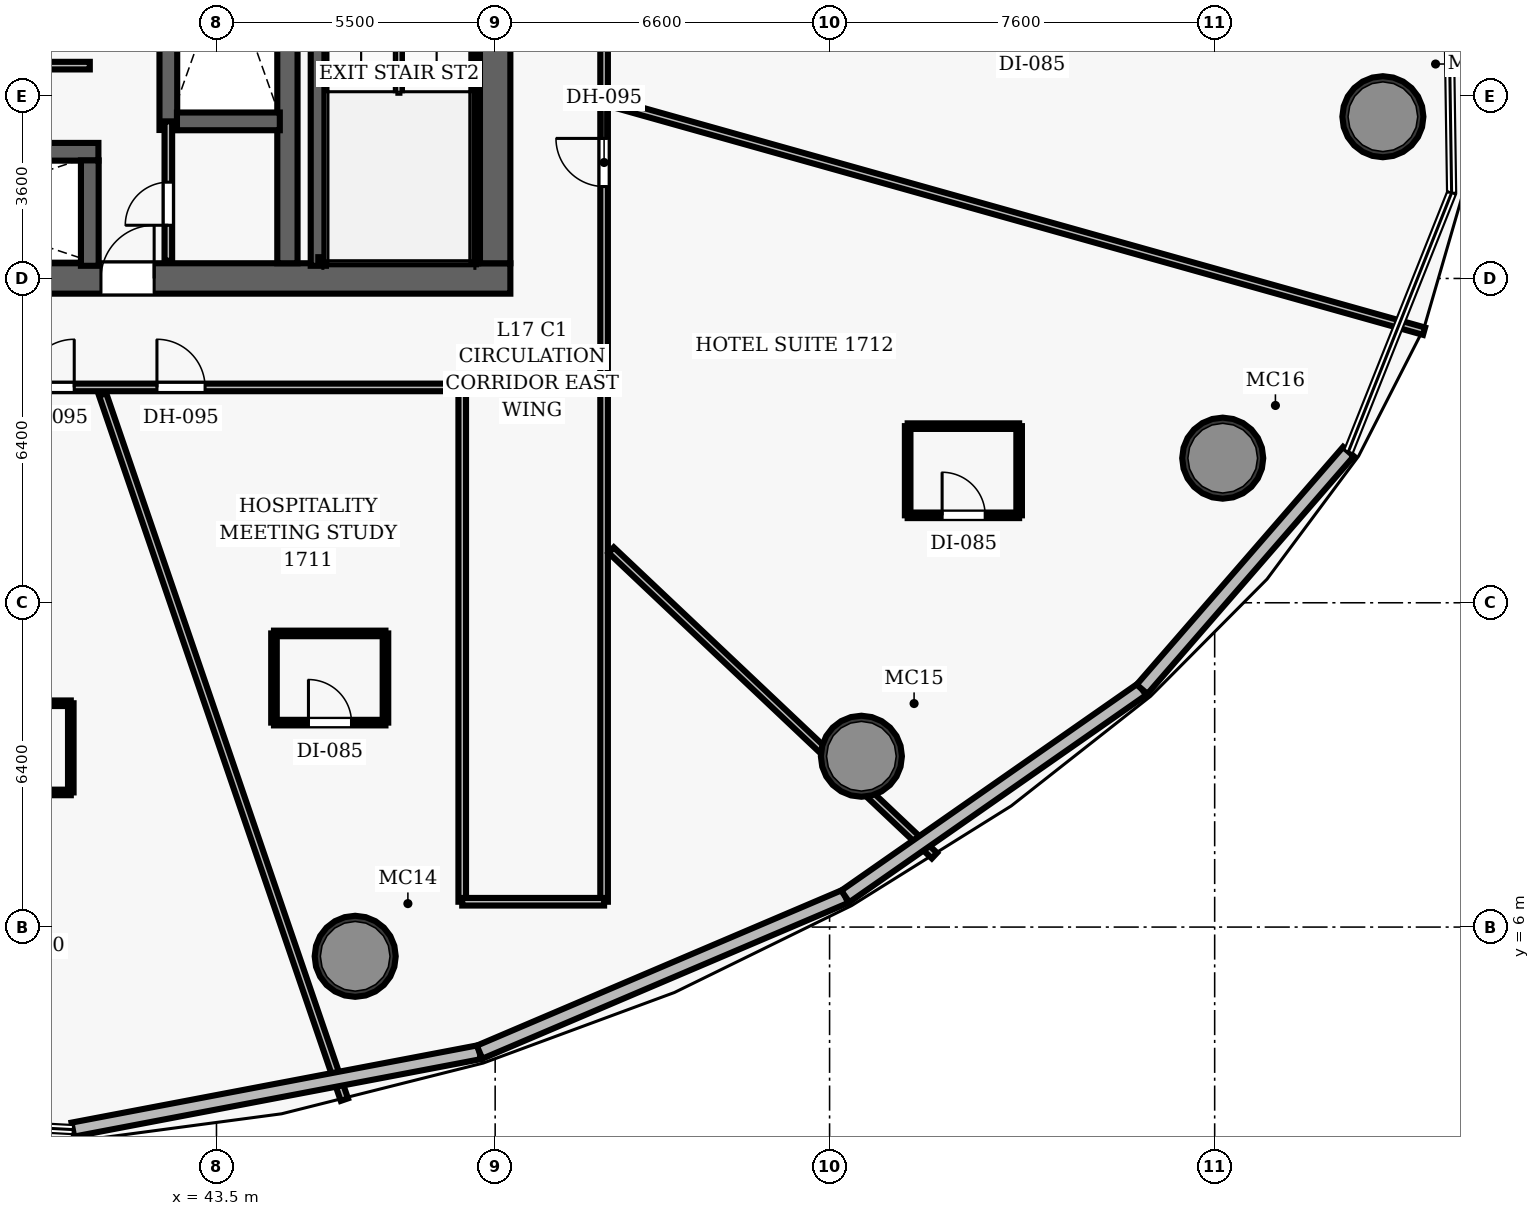
"""IFC4 building model, lengths in metres.
Left out: names, types, materials, properties, quantities, classifications, styles, units other than length and angle.
Written with IfcOpenShell. Run it as: python <this file> out.ifc"""

import sys

from ifc_helpers import new_model, si_unit, direction, frame, frame_2d, origin, origin_2d, place, context, subcontext, project, spatial, rectangle, hollow_circle, extrude, element, fill, save


model = new_model("IFC4")
c1 = context("Model", 3, precision=1e-05, world=origin(), true_north=direction((0.0, 1.0)))
c2 = subcontext(c1, "Body", "Model", "MODEL_VIEW")
j1 = project(units=[si_unit("LENGTHUNIT", "METRE"), si_unit("PLANEANGLEUNIT", "RADIAN")], contexts=[c1])
p1 = place(None, origin())
s1 = spatial("IfcSite", under=j1, at=p1, CompositionType="ELEMENT")
p2 = place(p1, origin())
s2 = spatial("IfcBuilding", under=s1, at=p2, CompositionType="ELEMENT")
p3 = place(p2, frame((0.0, 0.0, 76.4)))
s3 = spatial("IfcBuildingStorey", under=s2, at=p3, CompositionType="ELEMENT", Elevation=76.4)
p4 = place(p3, frame((26.7, 18.8, 0.0), z_axis=(0.0, 0.0, 1.0), x_axis=(1.0, 0.0, 0.0)))
e1 = element("IfcWall", 1, at=p4, inside=s3, PredefinedType="SHEAR", context=c2, shape_type="SweptSolid", body=[
    extrude(rectangle(XDim=22.6, YDim=0.6, at=frame_2d((11.3, 0.0))), origin(), (0.0, 0.0, 1.0), 3.5),
])
p5 = place(p4, frame((14.52, 0.0, 0.0)))
e2 = element("IfcOpeningElement", 2, at=p5, cuts=e1, PredefinedType="OPENING", context=c2, shape_type="SweptSolid", body=[
    extrude(rectangle(XDim=1.05, YDim=2.15, at=frame_2d((0.525, 1.075))), frame((0.0, 0.31, 0.0), z_axis=(0.0, -1.0, 0.0), x_axis=(1.0, 0.0, 0.0)), (0.0, 0.0, 1.0), 0.62),
])
p6 = place(p3, frame((49.0, 19.1, 0.0), z_axis=(0.0, 0.0, 1.0), x_axis=(0.0, 1.0, 0.0)))
e3 = element("IfcWall", 3, at=p6, inside=s3, PredefinedType="SHEAR", context=c2, shape_type="SweptSolid", body=[
    extrude(rectangle(XDim=13.8, YDim=0.6, at=frame_2d((6.9, 0.0))), origin(), (0.0, 0.0, 1.0), 3.5),
])
p7 = place(p6, frame((8.2, 0.0, 0.0)))
e4 = element("IfcOpeningElement", 4, at=p7, cuts=e3, PredefinedType="OPENING", context=c2, shape_type="SweptSolid", body=[
    extrude(rectangle(XDim=1.05, YDim=2.15, at=frame_2d((0.525, 1.075))), frame((0.0, 0.31, 0.0), z_axis=(0.0, -1.0, 0.0), x_axis=(1.0, 0.0, 0.0)), (0.0, 0.0, 1.0), 0.62),
])
p8 = place(p3, frame((44.9, 19.1, 0.0), z_axis=(0.0, 0.0, 1.0), x_axis=(0.0, 1.0, 0.0)))
e5 = element("IfcWall", 5, at=p8, inside=s3, PredefinedType="SHEAR", context=c2, shape_type="SweptSolid", body=[
    extrude(rectangle(XDim=13.8, YDim=0.4, at=frame_2d((6.9, 0.0))), origin(), (0.0, 0.0, 1.0), 3.5),
])
for number, where, z_axis, x_axis in (
    (6, (66.52, 21.992, 0.0), (0.0, 0.0, 1.0), (1.0, 0.0, 0.0)),
    (7, (46.238, 5.423, 0.0), (0.0, 0.0, 1.0), (1.0, 0.0, 0.0)),
    (8, (56.228, 9.371, 0.0), (0.0, 0.0, 1.0), (1.0, 0.0, 0.0)),
    (9, (63.359, 15.254, 0.0), (0.0, 0.0, 1.0), (1.0, 0.0, 0.0)),
):
    element("IfcColumn", number, at=place(p3, frame(where, z_axis=z_axis, x_axis=x_axis)), inside=s3, PredefinedType="COLUMN", context=c2, shape_type="SweptSolid", body=[
        extrude(hollow_circle(Radius=0.8, WallThickness=0.06, at=origin_2d()), origin(), (0.0, 0.0, 1.0), 3.5),
    ])
p9 = place(p3, frame((45.51, 19.05, 0.0), z_axis=(0.0, 0.0, 1.0), x_axis=(0.0, 1.0, 0.0)))
e10 = element("IfcWall", 10, at=p9, inside=s3, PredefinedType="SHEAR", context=c2, shape_type="SweptSolid", body=[
    extrude(rectangle(XDim=7.5, YDim=0.3, at=frame_2d((3.75, 0.0))), origin(), (0.0, 0.0, 1.0), 3.5),
])
p10 = place(p3, frame((48.605, 19.1, 0.0), z_axis=(0.0, 0.0, 1.0), x_axis=(0.0, 1.0, 0.0)))
e11 = element("IfcWall", 11, at=p10, inside=s3, PredefinedType="SHEAR", context=c2, shape_type="SweptSolid", body=[
    extrude(rectangle(XDim=7.45, YDim=0.12, at=frame_2d((3.725, 0.0))), origin(), (0.0, 0.0, 1.0), 3.5),
])
p11 = place(p3, frame((45.51, 19.16, 0.0), z_axis=(0.0, 0.0, 1.0), x_axis=(1.0, 0.0, 0.0)))
e12 = element("IfcWall", 12, at=p11, inside=s3, PredefinedType="SHEAR", context=c2, shape_type="SweptSolid", body=[
    extrude(rectangle(XDim=3.095, YDim=0.12, at=frame_2d((1.547, 0.0))), origin(), (0.0, 0.0, 1.0), 3.5),
])
p12 = place(p3, frame((42.55, 21.73, 0.0), z_axis=(0.0, 0.0, 1.0), x_axis=(0.0, 1.0, 0.0)))
e13 = element("IfcWall", 13, at=p12, inside=s3, PredefinedType="SHEAR", context=c2, shape_type="SweptSolid", body=[
    extrude(rectangle(XDim=6.54, YDim=0.35, at=frame_2d((3.27, 0.0))), origin(), (0.0, 0.0, 1.0), 2.6),
])
p13 = place(p3, frame((42.72, 21.9, 0.0), z_axis=(0.0, 0.0, 1.0), x_axis=(1.0, 0.0, 0.0)))
e14 = element("IfcWall", 14, at=p13, inside=s3, PredefinedType="SHEAR", context=c2, shape_type="SweptSolid", body=[
    extrude(rectangle(XDim=2.03, YDim=0.35, at=frame_2d((1.015, 0.0))), origin(), (0.0, 0.0, 1.0), 2.6),
])
p14 = place(p3, frame((34.49, 21.3, 0.0), z_axis=(0.0, 0.0, 1.0), x_axis=(1.0, 0.0, 0.0)))
e15 = element("IfcWall", 15, at=p14, inside=s3, PredefinedType="SHEAR", context=c2, shape_type="SweptSolid", body=[
    extrude(rectangle(XDim=6.68, YDim=0.35, at=frame_2d((3.34, 0.0))), origin(), (0.0, 0.0, 1.0), 2.6),
])
p15 = place(p3, frame((41.0, 19.05, 0.0), z_axis=(0.0, 0.0, 1.0), x_axis=(0.0, 1.0, 0.0)))
e16 = element("IfcWall", 16, at=p15, inside=s3, PredefinedType="SHEAR", context=c2, shape_type="SweptSolid", body=[
    extrude(rectangle(XDim=2.08, YDim=0.35, at=frame_2d((1.04, 0.0))), origin(), (0.0, 0.0, 1.0), 2.6),
])
p16 = place(p3, frame((34.75, 23.0, 0.0), z_axis=(0.0, 0.0, 1.0), x_axis=(1.0, 0.0, 0.0)))
e17 = element("IfcWall", 17, at=p16, inside=s3, PredefinedType="PARTITIONING", context=c2, shape_type="SweptSolid", body=[
    extrude(rectangle(XDim=6.25, YDim=0.15, at=frame_2d((3.125, 0.0))), origin(), (0.0, 0.0, 1.0), 2.6),
])
p17 = place(p3, frame((42.55, 19.15, 0.0), z_axis=(0.0, 0.0, 1.0), x_axis=(0.0, 1.0, 0.0)))
e18 = element("IfcWall", 18, at=p17, inside=s3, PredefinedType="PARTITIONING", context=c2, shape_type="SweptSolid", body=[
    extrude(rectangle(XDim=2.75, YDim=0.15, at=frame_2d((1.375, 0.0))), origin(), (0.0, 0.0, 1.0), 2.6),
])
p18 = place(p17, frame((0.7, 0.0, 0.0)))
e19 = element("IfcOpeningElement", 19, at=p18, cuts=e18, PredefinedType="OPENING", context=c2, shape_type="SweptSolid", body=[
    extrude(rectangle(XDim=0.85, YDim=2.1, at=frame_2d((0.425, 1.05))), frame((0.0, 0.085, 0.0), z_axis=(0.0, -1.0, 0.0), x_axis=(1.0, 0.0, 0.0)), (0.0, 0.0, 1.0), 0.17),
])
p19 = place(p3, frame((24.85, 16.65, 0.0), z_axis=(0.0, 0.0, 1.0), x_axis=(1.0, 0.0, 0.0)))
e20 = element("IfcWall", 20, at=p19, inside=s3, PredefinedType="PARTITIONING", context=c2, shape_type="SweptSolid", body=[
    extrude(rectangle(XDim=23.5, YDim=0.15, at=frame_2d((11.75, 0.0))), origin(), (0.0, 0.0, 1.0), 2.6),
])
p20 = place(p19, frame((4.362, 0.0, 0.0)))
e21 = element("IfcOpeningElement", 21, at=p20, cuts=e20, PredefinedType="OPENING", context=c2, shape_type="SweptSolid", body=[
    extrude(rectangle(XDim=0.95, YDim=2.15, at=frame_2d((0.475, 1.075))), frame((0.0, 0.085, 0.0), z_axis=(0.0, -1.0, 0.0), x_axis=(1.0, 0.0, 0.0)), (0.0, 0.0, 1.0), 0.17),
])
p21 = place(p19, frame((8.439, 0.0, 0.0)))
e22 = element("IfcOpeningElement", 22, at=p21, cuts=e20, PredefinedType="OPENING", context=c2, shape_type="SweptSolid", body=[
    extrude(rectangle(XDim=0.95, YDim=2.15, at=frame_2d((0.475, 1.075))), frame((0.0, 0.085, 0.0), z_axis=(0.0, -1.0, 0.0), x_axis=(1.0, 0.0, 0.0)), (0.0, 0.0, 1.0), 0.17),
])
p22 = place(p19, frame((14.893, 0.0, 0.0)))
e23 = element("IfcOpeningElement", 23, at=p22, cuts=e20, PredefinedType="OPENING", context=c2, shape_type="SweptSolid", body=[
    extrude(rectangle(XDim=0.95, YDim=2.15, at=frame_2d((0.475, 1.075))), frame((0.0, 0.085, 0.0), z_axis=(0.0, -1.0, 0.0), x_axis=(1.0, 0.0, 0.0)), (0.0, 0.0, 1.0), 0.17),
])
p23 = place(p19, frame((17.475, 0.0, 0.0)))
e24 = element("IfcOpeningElement", 24, at=p23, cuts=e20, PredefinedType="OPENING", context=c2, shape_type="SweptSolid", body=[
    extrude(rectangle(XDim=0.95, YDim=2.15, at=frame_2d((0.475, 1.075))), frame((0.0, 0.085, 0.0), z_axis=(0.0, -1.0, 0.0), x_axis=(1.0, 0.0, 0.0)), (0.0, 0.0, 1.0), 0.17),
])
p24 = place(p3, frame((51.15, 16.65, 0.0), z_axis=(0.0, 0.0, 1.0), x_axis=(0.0, 1.0, 0.0)))
e25 = element("IfcWall", 25, at=p24, inside=s3, PredefinedType="PARTITIONING", context=c2, shape_type="SweptSolid", body=[
    extrude(rectangle(XDim=15.9, YDim=0.15, at=frame_2d((7.95, 0.0))), origin(), (0.0, 0.0, 1.0), 2.6),
])
p25 = place(p24, frame((12.808, 0.0, 0.0)))
e26 = element("IfcOpeningElement", 26, at=p25, cuts=e25, PredefinedType="OPENING", context=c2, shape_type="SweptSolid", body=[
    extrude(rectangle(XDim=0.95, YDim=2.15, at=frame_2d((0.475, 1.075))), frame((0.0, 0.085, 0.0), z_axis=(0.0, -1.0, 0.0), x_axis=(1.0, 0.0, 0.0)), (0.0, 0.0, 1.0), 0.17),
])
p26 = place(p24, frame((3.964, 0.0, 0.0)))
e27 = element("IfcOpeningElement", 27, at=p26, cuts=e25, PredefinedType="OPENING", context=c2, shape_type="SweptSolid", body=[
    extrude(rectangle(XDim=0.95, YDim=2.15, at=frame_2d((0.475, 1.075))), frame((0.0, 0.085, 0.0), z_axis=(0.0, -1.0, 0.0), x_axis=(1.0, 0.0, 0.0)), (0.0, 0.0, 1.0), 0.17),
])
p27 = place(p24, frame((7.35, 0.0, 0.0)))
e28 = element("IfcOpeningElement", 28, at=p27, cuts=e25, PredefinedType="OPENING", context=c2, shape_type="SweptSolid", body=[
    extrude(rectangle(XDim=0.95, YDim=2.15, at=frame_2d((0.475, 1.075))), frame((0.0, 0.085, 0.0), z_axis=(0.0, -1.0, 0.0), x_axis=(1.0, 0.0, 0.0)), (0.0, 0.0, 1.0), 0.17),
])
for number, where, z_axis, x_axis in (
    (29, (48.35, 6.5, 0.0), (0.0, 0.0, 1.0), (0.0, 1.0, 0.0)),
    (30, (51.15, 6.5, 0.0), (0.0, 0.0, 1.0), (0.0, 1.0, 0.0)),
):
    element("IfcWall", number, at=place(p3, frame(where, z_axis=z_axis, x_axis=x_axis)), inside=s3, PredefinedType="PARTITIONING", context=c2, shape_type="SweptSolid", body=[
        extrude(rectangle(XDim=10.15, YDim=0.15, at=frame_2d((5.075, 0.0))), origin(), (0.0, 0.0, 1.0), 2.6),
    ])
p28 = place(p3, frame((48.35, 6.5, 0.0), z_axis=(0.0, 0.0, 1.0), x_axis=(1.0, 0.0, 0.0)))
e31 = element("IfcWall", 31, at=p28, inside=s3, PredefinedType="PARTITIONING", context=c2, shape_type="SweptSolid", body=[
    extrude(rectangle(XDim=2.8, YDim=0.15, at=frame_2d((1.4, 0.0))), origin(), (0.0, 0.0, 1.0), 2.6),
])
p29 = place(p3, frame((41.253, 16.51, 0.0), z_axis=(0.0, 0.0, 1.0), x_axis=(0.324297168355, -0.945955256128, 0.0)))
e32 = element("IfcWall", 32, at=p29, inside=s3, PredefinedType="PARTITIONING", context=c2, shape_type="SweptSolid", body=[
    extrude(rectangle(XDim=14.71, YDim=0.15, at=frame_2d((7.355, 0.0))), origin(), (0.0, 0.0, 1.0), 2.6),
])
p30 = place(p3, frame((51.29, 13.439, 0.0), z_axis=(0.0, 0.0, 1.0), x_axis=(0.726754697613, -0.686897087996, 0.0)))
e33 = element("IfcWall", 33, at=p30, inside=s3, PredefinedType="PARTITIONING", context=c2, shape_type="SweptSolid", body=[
    extrude(rectangle(XDim=8.778, YDim=0.15, at=frame_2d((4.389, 0.0))), origin(), (0.0, 0.0, 1.0), 2.6),
])
p31 = place(p3, frame((51.29, 22.266, 0.0), z_axis=(0.0, 0.0, 1.0), x_axis=(0.962729778271, -0.270465106863, 0.0)))
e34 = element("IfcWall", 34, at=p31, inside=s3, PredefinedType="PARTITIONING", context=c2, shape_type="SweptSolid", body=[
    extrude(rectangle(XDim=16.663, YDim=0.15, at=frame_2d((8.332, 0.0))), origin(), (0.0, 0.0, 1.0), 2.6),
])
p32 = place(p3, frame((38.425, 8.657, 0.0), z_axis=(0.0, 0.0, 1.0), x_axis=(1.0, 0.0, 0.0)))
e35 = element("IfcWall", 35, at=p32, inside=s3, PredefinedType="PARTITIONING", context=c2, shape_type="SweptSolid", body=[
    extrude(rectangle(XDim=2.2, YDim=0.11, at=frame_2d((1.1, 0.0))), origin(), (0.0, 0.0, 1.0), 2.6),
])
p33 = place(p32, frame((0.68, 0.0, 0.0)))
e36 = element("IfcOpeningElement", 36, at=p33, cuts=e35, PredefinedType="OPENING", context=c2, shape_type="SweptSolid", body=[
    extrude(rectangle(XDim=0.85, YDim=2.1, at=frame_2d((0.425, 1.05))), frame((0.0, 0.065, 0.0), z_axis=(0.0, -1.0, 0.0), x_axis=(1.0, 0.0, 0.0)), (0.0, 0.0, 1.0), 0.13),
])
p34 = place(p3, frame((38.425, 10.417, 0.0), z_axis=(0.0, 0.0, 1.0), x_axis=(1.0, 0.0, 0.0)))
e37 = element("IfcWall", 37, at=p34, inside=s3, PredefinedType="PARTITIONING", context=c2, shape_type="SweptSolid", body=[
    extrude(rectangle(XDim=2.2, YDim=0.11, at=frame_2d((1.1, 0.0))), origin(), (0.0, 0.0, 1.0), 2.6),
])
p35 = place(p3, frame((40.625, 8.657, 0.0), z_axis=(0.0, 0.0, 1.0), x_axis=(0.0, 1.0, 0.0)))
e38 = element("IfcWall", 38, at=p35, inside=s3, PredefinedType="PARTITIONING", context=c2, shape_type="SweptSolid", body=[
    extrude(rectangle(XDim=1.76, YDim=0.11, at=frame_2d((0.88, 0.0))), origin(), (0.0, 0.0, 1.0), 2.6),
])
p36 = place(p3, frame((44.635, 10.035, 0.0), z_axis=(0.0, 0.0, 1.0), x_axis=(1.0, 0.0, 0.0)))
e39 = element("IfcWall", 39, at=p36, inside=s3, PredefinedType="PARTITIONING", context=c2, shape_type="SweptSolid", body=[
    extrude(rectangle(XDim=2.2, YDim=0.11, at=frame_2d((1.1, 0.0))), origin(), (0.0, 0.0, 1.0), 2.6),
])
p37 = place(p36, frame((0.68, 0.0, 0.0)))
e40 = element("IfcOpeningElement", 40, at=p37, cuts=e39, PredefinedType="OPENING", context=c2, shape_type="SweptSolid", body=[
    extrude(rectangle(XDim=0.85, YDim=2.1, at=frame_2d((0.425, 1.05))), frame((0.0, 0.065, 0.0), z_axis=(0.0, -1.0, 0.0), x_axis=(1.0, 0.0, 0.0)), (0.0, 0.0, 1.0), 0.13),
])
p38 = place(p3, frame((44.635, 11.795, 0.0), z_axis=(0.0, 0.0, 1.0), x_axis=(1.0, 0.0, 0.0)))
e41 = element("IfcWall", 41, at=p38, inside=s3, PredefinedType="PARTITIONING", context=c2, shape_type="SweptSolid", body=[
    extrude(rectangle(XDim=2.2, YDim=0.11, at=frame_2d((1.1, 0.0))), origin(), (0.0, 0.0, 1.0), 2.6),
])
for number, where, z_axis, x_axis in (
    (42, (44.635, 10.035, 0.0), (0.0, 0.0, 1.0), (0.0, 1.0, 0.0)),
    (43, (46.835, 10.035, 0.0), (0.0, 0.0, 1.0), (0.0, 1.0, 0.0)),
):
    element("IfcWall", number, at=place(p3, frame(where, z_axis=z_axis, x_axis=x_axis)), inside=s3, PredefinedType="PARTITIONING", context=c2, shape_type="SweptSolid", body=[
        extrude(rectangle(XDim=1.76, YDim=0.11, at=frame_2d((0.88, 0.0))), origin(), (0.0, 0.0, 1.0), 2.6),
    ])
p39 = place(p3, frame((57.141, 14.126, 0.0), z_axis=(0.0, 0.0, 1.0), x_axis=(1.0, 0.0, 0.0)))
e44 = element("IfcWall", 44, at=p39, inside=s3, PredefinedType="PARTITIONING", context=c2, shape_type="SweptSolid", body=[
    extrude(rectangle(XDim=2.2, YDim=0.11, at=frame_2d((1.1, 0.0))), origin(), (0.0, 0.0, 1.0), 2.6),
])
p40 = place(p39, frame((0.68, 0.0, 0.0)))
e45 = element("IfcOpeningElement", 45, at=p40, cuts=e44, PredefinedType="OPENING", context=c2, shape_type="SweptSolid", body=[
    extrude(rectangle(XDim=0.85, YDim=2.1, at=frame_2d((0.425, 1.05))), frame((0.0, 0.065, 0.0), z_axis=(0.0, -1.0, 0.0), x_axis=(1.0, 0.0, 0.0)), (0.0, 0.0, 1.0), 0.13),
])
p41 = place(p3, frame((57.141, 15.886, 0.0), z_axis=(0.0, 0.0, 1.0), x_axis=(1.0, 0.0, 0.0)))
e46 = element("IfcWall", 46, at=p41, inside=s3, PredefinedType="PARTITIONING", context=c2, shape_type="SweptSolid", body=[
    extrude(rectangle(XDim=2.2, YDim=0.11, at=frame_2d((1.1, 0.0))), origin(), (0.0, 0.0, 1.0), 2.6),
])
for number, where, z_axis, x_axis in (
    (47, (57.141, 14.126, 0.0), (0.0, 0.0, 1.0), (0.0, 1.0, 0.0)),
    (48, (59.341, 14.126, 0.0), (0.0, 0.0, 1.0), (0.0, 1.0, 0.0)),
):
    element("IfcWall", number, at=place(p3, frame(where, z_axis=z_axis, x_axis=x_axis)), inside=s3, PredefinedType="PARTITIONING", context=c2, shape_type="SweptSolid", body=[
        extrude(rectangle(XDim=1.76, YDim=0.11, at=frame_2d((0.88, 0.0))), origin(), (0.0, 0.0, 1.0), 2.6),
    ])
p42 = place(p3, frame((48.692, 3.531, 0.0), z_axis=(0.0, 0.0, 1.0), x_axis=(-0.982367584705, -0.186959697585, 0.0)))
e49 = element("IfcWall", 49, at=p42, inside=s3, PredefinedType="SOLIDWALL", context=c2, shape_type="SweptSolid", body=[
    extrude(rectangle(XDim=8.171, YDim=0.28, at=frame_2d((4.085, 0.0))), origin(), (0.0, 0.0, 1.0), 3.25),
])
p43 = place(p3, frame((55.91, 6.605, 0.0), z_axis=(0.0, 0.0, 1.0), x_axis=(-0.920047247752, -0.391807429617, 0.0)))
e50 = element("IfcWall", 50, at=p43, inside=s3, PredefinedType="SOLIDWALL", context=c2, shape_type="SweptSolid", body=[
    extrude(rectangle(XDim=7.845, YDim=0.28, at=frame_2d((3.922, 0.0))), origin(), (0.0, 0.0, 1.0), 3.25),
])
p44 = place(p3, frame((61.767, 10.693, 0.0), z_axis=(0.0, 0.0, 1.0), x_axis=(-0.820013170428, -0.572344651695, 0.0)))
e51 = element("IfcWall", 51, at=p44, inside=s3, PredefinedType="SOLIDWALL", context=c2, shape_type="SweptSolid", body=[
    extrude(rectangle(XDim=7.143, YDim=0.28, at=frame_2d((3.571, 0.0))), origin(), (0.0, 0.0, 1.0), 3.25),
])
p45 = place(p3, frame((65.84, 15.383, 0.0), z_axis=(0.0, 0.0, 1.0), x_axis=(-0.655684297122, -0.755035166405, 0.0)))
e52 = element("IfcWall", 52, at=p45, inside=s3, PredefinedType="SOLIDWALL", context=c2, shape_type="SweptSolid", body=[
    extrude(rectangle(XDim=6.212, YDim=0.28, at=frame_2d((3.106, 0.0))), origin(), (0.0, 0.0, 1.0), 3.25),
])
p46 = place(p5, origin())
e53 = element("IfcDoor", 53, at=p46, inside=s3, OperationType="SINGLE_SWING_RIGHT", PredefinedType="DOOR", context=c2, shape_type="SweptSolid", body=[
    extrude(rectangle(XDim=1.05, YDim=2.15, at=frame_2d((0.525, 1.075))), frame((0.0, 0.025, 0.0), z_axis=(0.0, -1.0, 0.0), x_axis=(1.0, 0.0, 0.0)), (0.0, 0.0, 1.0), 0.05),
])
fill(e2, e53)
p47 = place(p18, origin())
e54 = element("IfcDoor", 54, at=p47, inside=s3, OperationType="SINGLE_SWING_LEFT", PredefinedType="DOOR", context=c2, shape_type="SweptSolid", body=[
    extrude(rectangle(XDim=0.85, YDim=2.1, at=frame_2d((0.425, 1.05))), frame((0.0, 0.025, 0.0), z_axis=(0.0, -1.0, 0.0), x_axis=(1.0, 0.0, 0.0)), (0.0, 0.0, 1.0), 0.05),
])
fill(e19, e54)
p48 = place(p22, origin())
e55 = element("IfcDoor", 55, at=p48, inside=s3, OperationType="SINGLE_SWING_RIGHT", PredefinedType="DOOR", context=c2, shape_type="SweptSolid", body=[
    extrude(rectangle(XDim=0.95, YDim=2.15, at=frame_2d((0.475, 1.075))), frame((0.0, 0.025, 0.0), z_axis=(0.0, -1.0, 0.0), x_axis=(1.0, 0.0, 0.0)), (0.0, 0.0, 1.0), 0.05),
])
fill(e23, e55)
p49 = place(p23, origin())
e56 = element("IfcDoor", 56, at=p49, inside=s3, OperationType="SINGLE_SWING_LEFT", PredefinedType="DOOR", context=c2, shape_type="SweptSolid", body=[
    extrude(rectangle(XDim=0.95, YDim=2.15, at=frame_2d((0.475, 1.075))), frame((0.0, 0.025, 0.0), z_axis=(0.0, -1.0, 0.0), x_axis=(1.0, 0.0, 0.0)), (0.0, 0.0, 1.0), 0.05),
])
fill(e24, e56)
p50 = place(p37, origin())
e57 = element("IfcDoor", 57, at=p50, inside=s3, OperationType="SINGLE_SWING_LEFT", PredefinedType="DOOR", context=c2, shape_type="SweptSolid", body=[
    extrude(rectangle(XDim=0.85, YDim=2.1, at=frame_2d((0.425, 1.05))), frame((0.0, 0.025, 0.0), z_axis=(0.0, -1.0, 0.0), x_axis=(1.0, 0.0, 0.0)), (0.0, 0.0, 1.0), 0.05),
])
fill(e40, e57)
p51 = place(p26, origin())
e58 = element("IfcDoor", 58, at=p51, inside=s3, OperationType="SINGLE_SWING_RIGHT", PredefinedType="DOOR", context=c2, shape_type="SweptSolid", body=[
    extrude(rectangle(XDim=0.95, YDim=2.15, at=frame_2d((0.475, 1.075))), frame((0.0, 0.025, 0.0), z_axis=(0.0, -1.0, 0.0), x_axis=(1.0, 0.0, 0.0)), (0.0, 0.0, 1.0), 0.05),
])
fill(e27, e58)
p52 = place(p40, origin())
e59 = element("IfcDoor", 59, at=p52, inside=s3, OperationType="SINGLE_SWING_LEFT", PredefinedType="DOOR", context=c2, shape_type="SweptSolid", body=[
    extrude(rectangle(XDim=0.85, YDim=2.1, at=frame_2d((0.425, 1.05))), frame((0.0, 0.025, 0.0), z_axis=(0.0, -1.0, 0.0), x_axis=(1.0, 0.0, 0.0)), (0.0, 0.0, 1.0), 0.05),
])
fill(e45, e59)
save(model, sys.argv[1])
